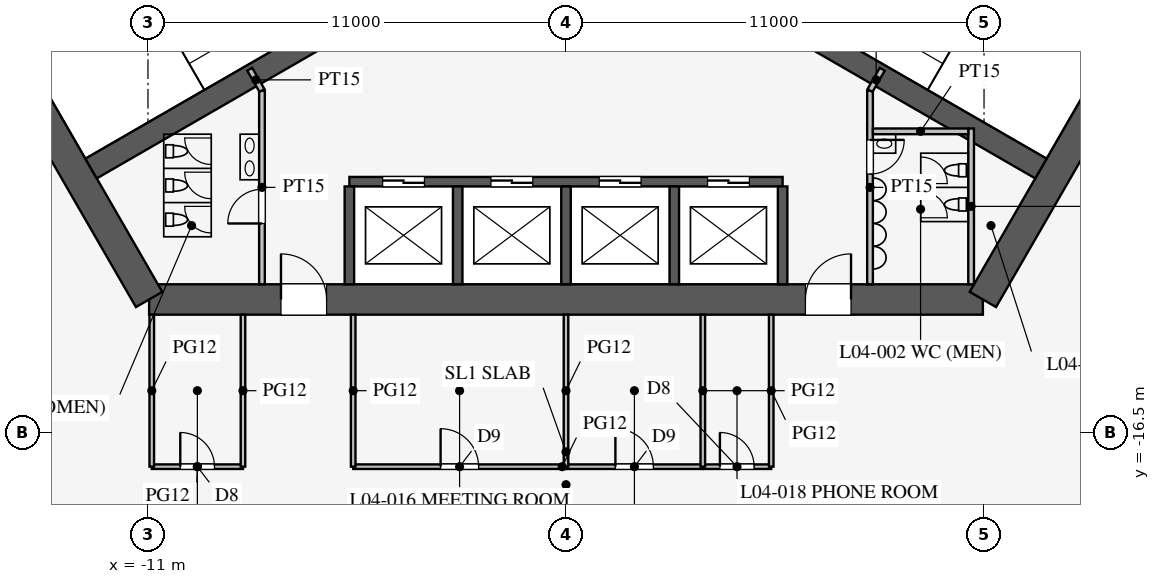
"""IFC4 building model, lengths in metres.
Left out: names, types, materials, properties, quantities, classifications, styles, units other than length and angle.
Written with IfcOpenShell. Run it as: python <this file> out.ifc"""

import sys

from ifc_helpers import new_model, si_unit, direction, frame, frame_2d, origin, place, context, subcontext, project, spatial, rectangle, extrude, element, fill, save


model = new_model("IFC4")
c1 = context("Model", 3, precision=1e-05, world=origin(), true_north=direction((0.0, 1.0)))
c2 = subcontext(c1, "Body", "Model", "MODEL_VIEW")
j1 = project(units=[si_unit("LENGTHUNIT", "METRE"), si_unit("PLANEANGLEUNIT", "RADIAN")], contexts=[c1])
p1 = place(None, origin())
s1 = spatial("IfcSite", under=j1, at=p1, CompositionType="ELEMENT")
p2 = place(p1, origin())
s2 = spatial("IfcBuilding", under=s1, at=p2, CompositionType="ELEMENT")
p3 = place(p2, frame((0.0, 0.0, 20.7)))
s3 = spatial("IfcBuildingStorey", under=s2, at=p3, CompositionType="ELEMENT", Elevation=20.7)
p4 = place(p3, frame((-10.97, -13.0, 0.0), z_axis=(0.0, 0.0, 1.0), x_axis=(1.0, 0.0, 0.0)))
e1 = element("IfcWall", 1, at=p4, inside=s3, PredefinedType="SHEAR", context=c2, shape_type="SweptSolid", body=[
    extrude(rectangle(XDim=21.939, YDim=0.8, at=frame_2d((10.97, 0.0))), origin(), (0.0, 0.0, 1.0), 4.2),
])
p5 = place(p4, frame((17.27, 0.0, 0.0)))
e2 = element("IfcOpeningElement", 2, at=p5, cuts=e1, PredefinedType="OPENING", context=c2, shape_type="SweptSolid", body=[
    extrude(rectangle(XDim=1.2, YDim=2.1, at=frame_2d((0.6, 1.05))), frame((0.0, 0.41, 0.0), z_axis=(0.0, -1.0, 0.0), x_axis=(1.0, 0.0, 0.0)), (0.0, 0.0, 1.0), 0.82),
])
p6 = place(p4, frame((3.47, 0.0, 0.0)))
e3 = element("IfcOpeningElement", 3, at=p6, cuts=e1, PredefinedType="OPENING", context=c2, shape_type="SweptSolid", body=[
    extrude(rectangle(XDim=1.2, YDim=2.1, at=frame_2d((0.6, 1.05))), frame((0.0, 0.41, 0.0), z_axis=(0.0, -1.0, 0.0), x_axis=(1.0, 0.0, 0.0)), (0.0, 0.0, 1.0), 0.82),
])
for number, where, z_axis, x_axis in (
    (4, (10.97, -13.0, 0.0), (0.0, 0.0, 1.0), (0.5, 0.866, 0.0)),
    (5, (-16.743, -3.0, 0.0), (0.0, 0.0, 1.0), (0.5, -0.866, 0.0)),
):
    element("IfcWall", number, at=place(p3, frame(where, z_axis=z_axis, x_axis=x_axis)), inside=s3, PredefinedType="SHEAR", context=c2, shape_type="SweptSolid", body=[
        extrude(rectangle(XDim=11.547, YDim=0.8, at=frame_2d((5.773, 0.0))), origin(), (0.0, 0.0, 1.0), 4.2),
    ])
p7 = place(p3, frame((-5.7, -9.9, 0.0), z_axis=(0.0, 0.0, 1.0), x_axis=(1.0, 0.0, 0.0)))
e6 = element("IfcWall", 6, at=p7, inside=s3, PredefinedType="SHEAR", context=c2, shape_type="SweptSolid", body=[
    extrude(rectangle(XDim=11.4, YDim=0.25, at=frame_2d((5.7, 0.0))), origin(), (0.0, 0.0, 1.0), 4.2),
])
p8 = place(p7, frame((0.875, 0.0, 0.0)))
e7 = element("IfcOpeningElement", 7, at=p8, cuts=e6, PredefinedType="OPENING", context=c2, shape_type="SweptSolid", body=[
    extrude(rectangle(XDim=1.1, YDim=2.2, at=frame_2d((0.55, 1.1))), frame((0.0, 0.135, 0.0), z_axis=(0.0, -1.0, 0.0), x_axis=(1.0, 0.0, 0.0)), (0.0, 0.0, 1.0), 0.27),
])
p9 = place(p7, frame((3.725, 0.0, 0.0)))
e8 = element("IfcOpeningElement", 8, at=p9, cuts=e6, PredefinedType="OPENING", context=c2, shape_type="SweptSolid", body=[
    extrude(rectangle(XDim=1.1, YDim=2.2, at=frame_2d((0.55, 1.1))), frame((0.0, 0.135, 0.0), z_axis=(0.0, -1.0, 0.0), x_axis=(1.0, 0.0, 0.0)), (0.0, 0.0, 1.0), 0.27),
])
p10 = place(p7, frame((6.575, 0.0, 0.0)))
e9 = element("IfcOpeningElement", 9, at=p10, cuts=e6, PredefinedType="OPENING", context=c2, shape_type="SweptSolid", body=[
    extrude(rectangle(XDim=1.1, YDim=2.2, at=frame_2d((0.55, 1.1))), frame((0.0, 0.135, 0.0), z_axis=(0.0, -1.0, 0.0), x_axis=(1.0, 0.0, 0.0)), (0.0, 0.0, 1.0), 0.27),
])
p11 = place(p7, frame((9.425, 0.0, 0.0)))
e10 = element("IfcOpeningElement", 10, at=p11, cuts=e6, PredefinedType="OPENING", context=c2, shape_type="SweptSolid", body=[
    extrude(rectangle(XDim=1.1, YDim=2.2, at=frame_2d((0.55, 1.1))), frame((0.0, 0.135, 0.0), z_axis=(0.0, -1.0, 0.0), x_axis=(1.0, 0.0, 0.0)), (0.0, 0.0, 1.0), 0.27),
])
for number, where, z_axis, x_axis in (
    (11, (-5.7, -10.025, 0.0), (0.0, 0.0, 1.0), (0.0, -1.0, 0.0)),
    (12, (-2.85, -10.025, 0.0), (0.0, 0.0, 1.0), (0.0, -1.0, 0.0)),
    (13, (0.0, -10.025, 0.0), (0.0, 0.0, 1.0), (0.0, -1.0, 0.0)),
    (14, (2.85, -10.025, 0.0), (0.0, 0.0, 1.0), (0.0, -1.0, 0.0)),
    (15, (5.7, -10.025, 0.0), (0.0, 0.0, 1.0), (0.0, -1.0, 0.0)),
):
    element("IfcWall", number, at=place(p3, frame(where, z_axis=z_axis, x_axis=x_axis)), inside=s3, PredefinedType="SHEAR", context=c2, shape_type="SweptSolid", body=[
        extrude(rectangle(XDim=2.575, YDim=0.25, at=frame_2d((1.288, 0.0))), origin(), (0.0, 0.0, 1.0), 4.2),
    ])
for number, where, z_axis, x_axis in (
    (16, (4.638, -5.016, 0.0), (0.0, 0.0, 1.0), (0.866, -0.5, 0.0)),
    (17, (-4.638, -5.016, 0.0), (0.0, 0.0, 1.0), (-0.866, -0.5, 0.0)),
):
    element("IfcWall", number, at=place(p3, frame(where, z_axis=z_axis, x_axis=x_axis)), inside=s3, PredefinedType="SHEAR", context=c2, shape_type="SweptSolid", body=[
        extrude(rectangle(XDim=9.075, YDim=0.6, at=frame_2d((4.538, 0.0))), origin(), (0.0, 0.0, 1.0), 4.2),
    ])
p12 = place(p3, frame((8.0, -7.5, 0.0), z_axis=(0.0, 0.0, 1.0), x_axis=(0.0, -1.0, 0.0)))
e18 = element("IfcWall", 18, at=p12, inside=s3, PredefinedType="PARTITIONING", context=c2, shape_type="SweptSolid", body=[
    extrude(rectangle(XDim=5.1, YDim=0.15, at=frame_2d((2.55, 0.0))), origin(), (0.0, 0.0, 1.0), 4.0),
])
p13 = place(p12, frame((1.3, 0.0, 0.0)))
e19 = element("IfcOpeningElement", 19, at=p13, cuts=e18, PredefinedType="OPENING", context=c2, shape_type="SweptSolid", body=[
    extrude(rectangle(XDim=0.9, YDim=2.1, at=frame_2d((0.45, 1.05))), frame((0.0, 0.085, 0.0), z_axis=(0.0, -1.0, 0.0), x_axis=(1.0, 0.0, 0.0)), (0.0, 0.0, 1.0), 0.17),
])
p14 = place(p3, frame((-8.0, -7.5, 0.0), z_axis=(0.0, 0.0, 1.0), x_axis=(0.0, -1.0, 0.0)))
e20 = element("IfcWall", 20, at=p14, inside=s3, PredefinedType="PARTITIONING", context=c2, shape_type="SweptSolid", body=[
    extrude(rectangle(XDim=5.1, YDim=0.15, at=frame_2d((2.55, 0.0))), origin(), (0.0, 0.0, 1.0), 4.0),
])
p15 = place(p14, frame((2.6, 0.0, 0.0)))
e21 = element("IfcOpeningElement", 21, at=p15, cuts=e20, PredefinedType="OPENING", context=c2, shape_type="SweptSolid", body=[
    extrude(rectangle(XDim=0.9, YDim=2.1, at=frame_2d((0.45, 1.05))), frame((0.0, 0.085, 0.0), z_axis=(0.0, -1.0, 0.0), x_axis=(1.0, 0.0, 0.0)), (0.0, 0.0, 1.0), 0.17),
])
for number, where, z_axis, x_axis in (
    (22, (8.0, -7.5, 0.0), (0.0, 0.0, 1.0), (0.5, 0.866, 0.0)),
    (23, (-8.0, -7.5, 0.0), (0.0, 0.0, 1.0), (-0.5, 0.866, 0.0)),
):
    element("IfcWall", number, at=place(p3, frame(where, z_axis=z_axis, x_axis=x_axis)), inside=s3, PredefinedType="PARTITIONING", context=c2, shape_type="SweptSolid", body=[
        extrude(rectangle(XDim=0.645, YDim=0.15, at=frame_2d((0.323, 0.0))), origin(), (0.0, 0.0, 1.0), 4.0),
    ])
p16 = place(p3, frame((10.66, -8.5, 0.0), z_axis=(0.0, 0.0, 1.0), x_axis=(0.0, -1.0, 0.0)))
e24 = element("IfcWall", 24, at=p16, inside=s3, PredefinedType="PARTITIONING", context=c2, shape_type="SweptSolid", body=[
    extrude(rectangle(XDim=4.1, YDim=0.15, at=frame_2d((2.05, 0.0))), origin(), (0.0, 0.0, 1.0), 4.0),
])
p17 = place(p3, frame((8.075, -8.575, 0.0), z_axis=(0.0, 0.0, 1.0), x_axis=(1.0, 0.0, 0.0)))
e25 = element("IfcWall", 25, at=p17, inside=s3, PredefinedType="PARTITIONING", context=c2, shape_type="SweptSolid", body=[
    extrude(rectangle(XDim=2.51, YDim=0.15, at=frame_2d((1.255, 0.0))), origin(), (0.0, 0.0, 1.0), 4.0),
])
p18 = place(p3, frame((3.6, -17.4, 0.0), z_axis=(0.0, 0.0, 1.0), x_axis=(1.0, 0.0, 0.0)))
e26 = element("IfcWall", 26, at=p18, inside=s3, PredefinedType="PARTITIONING", context=c2, shape_type="SweptSolid", body=[
    extrude(rectangle(XDim=1.8, YDim=0.12, at=frame_2d((0.9, 0.0))), origin(), (0.0, 0.0, 1.0), 2.9),
])
p19 = place(p18, frame((0.45, 0.0, 0.15)))
e27 = element("IfcOpeningElement", 27, at=p19, cuts=e26, PredefinedType="OPENING", context=c2, shape_type="SweptSolid", body=[
    extrude(rectangle(XDim=0.9, YDim=2.1, at=frame_2d((0.45, 1.05))), frame((0.0, 0.07, 0.0), z_axis=(0.0, -1.0, 0.0), x_axis=(1.0, 0.0, 0.0)), (0.0, 0.0, 1.0), 0.14),
])
p20 = place(p3, frame((0.0, -17.4, 0.0), z_axis=(0.0, 0.0, 1.0), x_axis=(1.0, 0.0, 0.0)))
e28 = element("IfcWall", 28, at=p20, inside=s3, PredefinedType="PARTITIONING", context=c2, shape_type="SweptSolid", body=[
    extrude(rectangle(XDim=3.6, YDim=0.12, at=frame_2d((1.8, 0.0))), origin(), (0.0, 0.0, 1.0), 2.9),
])
p21 = place(p20, frame((1.3, 0.0, 0.15)))
e29 = element("IfcOpeningElement", 29, at=p21, cuts=e28, PredefinedType="OPENING", context=c2, shape_type="SweptSolid", body=[
    extrude(rectangle(XDim=1.0, YDim=2.1, at=frame_2d((0.5, 1.05))), frame((0.0, 0.07, 0.0), z_axis=(0.0, -1.0, 0.0), x_axis=(1.0, 0.0, 0.0)), (0.0, 0.0, 1.0), 0.14),
])
p22 = place(p3, frame((-10.9, -17.4, 0.0), z_axis=(0.0, 0.0, 1.0), x_axis=(1.0, 0.0, 0.0)))
e30 = element("IfcWall", 30, at=p22, inside=s3, PredefinedType="PARTITIONING", context=c2, shape_type="SweptSolid", body=[
    extrude(rectangle(XDim=2.4, YDim=0.12, at=frame_2d((1.2, 0.0))), origin(), (0.0, 0.0, 1.0), 2.9),
])
p23 = place(p22, frame((0.75, 0.0, 0.15)))
e31 = element("IfcOpeningElement", 31, at=p23, cuts=e30, PredefinedType="OPENING", context=c2, shape_type="SweptSolid", body=[
    extrude(rectangle(XDim=0.9, YDim=2.1, at=frame_2d((0.45, 1.05))), frame((0.0, 0.07, 0.0), z_axis=(0.0, -1.0, 0.0), x_axis=(1.0, 0.0, 0.0)), (0.0, 0.0, 1.0), 0.14),
])
p24 = place(p3, frame((-5.6, -17.4, 0.0), z_axis=(0.0, 0.0, 1.0), x_axis=(1.0, 0.0, 0.0)))
e32 = element("IfcWall", 32, at=p24, inside=s3, PredefinedType="PARTITIONING", context=c2, shape_type="SweptSolid", body=[
    extrude(rectangle(XDim=5.6, YDim=0.12, at=frame_2d((2.8, 0.0))), origin(), (0.0, 0.0, 1.0), 2.9),
])
p25 = place(p24, frame((2.3, 0.0, 0.15)))
e33 = element("IfcOpeningElement", 33, at=p25, cuts=e32, PredefinedType="OPENING", context=c2, shape_type="SweptSolid", body=[
    extrude(rectangle(XDim=1.0, YDim=2.1, at=frame_2d((0.5, 1.05))), frame((0.0, 0.07, 0.0), z_axis=(0.0, -1.0, 0.0), x_axis=(1.0, 0.0, 0.0)), (0.0, 0.0, 1.0), 0.14),
])
for number, where, z_axis, x_axis in (
    (34, (3.6, -13.4, 0.0), (0.0, 0.0, 1.0), (0.0, -1.0, 0.0)),
    (35, (5.4, -13.4, 0.0), (0.0, 0.0, 1.0), (0.0, -1.0, 0.0)),
    (36, (0.0, -13.4, 0.0), (0.0, 0.0, 1.0), (0.0, -1.0, 0.0)),
    (37, (-10.9, -13.4, 0.0), (0.0, 0.0, 1.0), (0.0, -1.0, 0.0)),
    (38, (-5.6, -13.4, 0.0), (0.0, 0.0, 1.0), (0.0, -1.0, 0.0)),
    (39, (-8.5, -13.4, 0.0), (0.0, 0.0, 1.0), (0.0, -1.0, 0.0)),
):
    element("IfcWall", number, at=place(p3, frame(where, z_axis=z_axis, x_axis=x_axis)), inside=s3, PredefinedType="PARTITIONING", context=c2, shape_type="SweptSolid", body=[
        extrude(rectangle(XDim=4.0, YDim=0.12, at=frame_2d((2.0, 0.0))), origin(), (0.0, 0.0, 1.0), 2.9),
    ])
p26 = place(p13, origin())
e40 = element("IfcDoor", 40, at=p26, inside=s3, OperationType="SINGLE_SWING_LEFT", PredefinedType="DOOR", context=c2, shape_type="SweptSolid", body=[
    extrude(rectangle(XDim=0.9, YDim=2.1, at=frame_2d((0.45, 1.05))), frame((0.0, 0.025, 0.0), z_axis=(0.0, -1.0, 0.0), x_axis=(1.0, 0.0, 0.0)), (0.0, 0.0, 1.0), 0.05),
])
fill(e19, e40)
p27 = place(p15, frame((0.9, 0.0, 0.0), z_axis=(0.0, 0.0, 1.0), x_axis=(-1.0, 0.0, 0.0)))
e41 = element("IfcDoor", 41, at=p27, inside=s3, OperationType="SINGLE_SWING_LEFT", PredefinedType="DOOR", context=c2, shape_type="SweptSolid", body=[
    extrude(rectangle(XDim=0.9, YDim=2.1, at=frame_2d((0.45, 1.05))), frame((0.0, 0.025, 0.0), z_axis=(0.0, -1.0, 0.0), x_axis=(1.0, 0.0, 0.0)), (0.0, 0.0, 1.0), 0.05),
])
fill(e21, e41)
p28 = place(p5, origin())
e42 = element("IfcDoor", 42, at=p28, inside=s3, OperationType="SINGLE_SWING_RIGHT", PredefinedType="DOOR", context=c2, shape_type="SweptSolid", body=[
    extrude(rectangle(XDim=1.2, YDim=2.1, at=frame_2d((0.6, 1.05))), frame((0.0, 0.025, 0.0), z_axis=(0.0, -1.0, 0.0), x_axis=(1.0, 0.0, 0.0)), (0.0, 0.0, 1.0), 0.05),
])
fill(e2, e42)
p29 = place(p6, origin())
e43 = element("IfcDoor", 43, at=p29, inside=s3, OperationType="SINGLE_SWING_LEFT", PredefinedType="DOOR", context=c2, shape_type="SweptSolid", body=[
    extrude(rectangle(XDim=1.2, YDim=2.1, at=frame_2d((0.6, 1.05))), frame((0.0, 0.025, 0.0), z_axis=(0.0, -1.0, 0.0), x_axis=(1.0, 0.0, 0.0)), (0.0, 0.0, 1.0), 0.05),
])
fill(e3, e43)
p30 = place(p25, origin())
e44 = element("IfcDoor", 44, at=p30, inside=s3, OperationType="SINGLE_SWING_LEFT", PredefinedType="DOOR", context=c2, shape_type="SweptSolid", body=[
    extrude(rectangle(XDim=1.0, YDim=2.1, at=frame_2d((0.5, 1.05))), frame((0.0, 0.025, 0.0), z_axis=(0.0, -1.0, 0.0), x_axis=(1.0, 0.0, 0.0)), (0.0, 0.0, 1.0), 0.05),
])
fill(e33, e44)
p31 = place(p21, origin())
e45 = element("IfcDoor", 45, at=p31, inside=s3, OperationType="SINGLE_SWING_LEFT", PredefinedType="DOOR", context=c2, shape_type="SweptSolid", body=[
    extrude(rectangle(XDim=1.0, YDim=2.1, at=frame_2d((0.5, 1.05))), frame((0.0, 0.025, 0.0), z_axis=(0.0, -1.0, 0.0), x_axis=(1.0, 0.0, 0.0)), (0.0, 0.0, 1.0), 0.05),
])
fill(e29, e45)
p32 = place(p19, origin())
e46 = element("IfcDoor", 46, at=p32, inside=s3, OperationType="SINGLE_SWING_LEFT", PredefinedType="DOOR", context=c2, shape_type="SweptSolid", body=[
    extrude(rectangle(XDim=0.9, YDim=2.1, at=frame_2d((0.45, 1.05))), frame((0.0, 0.025, 0.0), z_axis=(0.0, -1.0, 0.0), x_axis=(1.0, 0.0, 0.0)), (0.0, 0.0, 1.0), 0.05),
])
fill(e27, e46)
p33 = place(p23, origin())
e47 = element("IfcDoor", 47, at=p33, inside=s3, OperationType="SINGLE_SWING_LEFT", PredefinedType="DOOR", context=c2, shape_type="SweptSolid", body=[
    extrude(rectangle(XDim=0.9, YDim=2.1, at=frame_2d((0.45, 1.05))), frame((0.0, 0.025, 0.0), z_axis=(0.0, -1.0, 0.0), x_axis=(1.0, 0.0, 0.0)), (0.0, 0.0, 1.0), 0.05),
])
fill(e31, e47)
p34 = place(p8, origin())
e48 = element("IfcDoor", 48, at=p34, inside=s3, OperationType="DOUBLE_DOOR_SLIDING", PredefinedType="DOOR", context=c2, shape_type="SweptSolid", body=[
    extrude(rectangle(XDim=1.1, YDim=2.2, at=frame_2d((0.55, 1.1))), frame((0.0, 0.025, 0.0), z_axis=(0.0, -1.0, 0.0), x_axis=(1.0, 0.0, 0.0)), (0.0, 0.0, 1.0), 0.05),
])
fill(e7, e48)
p35 = place(p9, origin())
e49 = element("IfcDoor", 49, at=p35, inside=s3, OperationType="DOUBLE_DOOR_SLIDING", PredefinedType="DOOR", context=c2, shape_type="SweptSolid", body=[
    extrude(rectangle(XDim=1.1, YDim=2.2, at=frame_2d((0.55, 1.1))), frame((0.0, 0.025, 0.0), z_axis=(0.0, -1.0, 0.0), x_axis=(1.0, 0.0, 0.0)), (0.0, 0.0, 1.0), 0.05),
])
fill(e8, e49)
p36 = place(p10, origin())
e50 = element("IfcDoor", 50, at=p36, inside=s3, OperationType="DOUBLE_DOOR_SLIDING", PredefinedType="DOOR", context=c2, shape_type="SweptSolid", body=[
    extrude(rectangle(XDim=1.1, YDim=2.2, at=frame_2d((0.55, 1.1))), frame((0.0, 0.025, 0.0), z_axis=(0.0, -1.0, 0.0), x_axis=(1.0, 0.0, 0.0)), (0.0, 0.0, 1.0), 0.05),
])
fill(e9, e50)
p37 = place(p11, origin())
e51 = element("IfcDoor", 51, at=p37, inside=s3, OperationType="DOUBLE_DOOR_SLIDING", PredefinedType="DOOR", context=c2, shape_type="SweptSolid", body=[
    extrude(rectangle(XDim=1.1, YDim=2.2, at=frame_2d((0.55, 1.1))), frame((0.0, 0.025, 0.0), z_axis=(0.0, -1.0, 0.0), x_axis=(1.0, 0.0, 0.0)), (0.0, 0.0, 1.0), 0.05),
])
fill(e10, e51)
save(model, sys.argv[1])
